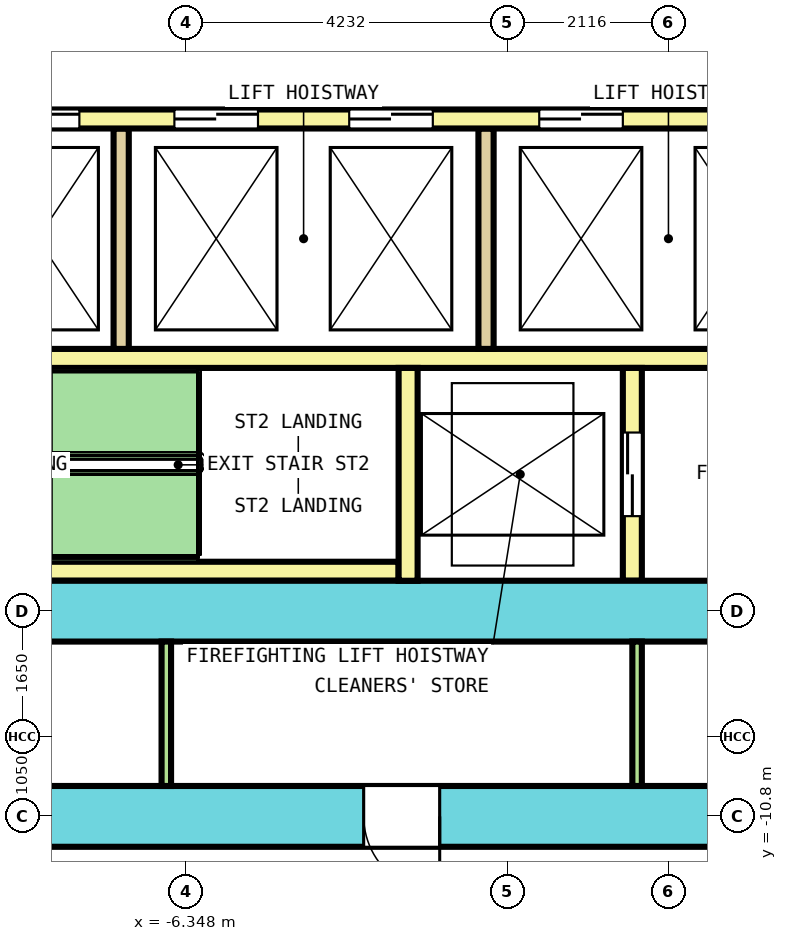
"""IFC4 building model, lengths in metres.
Left out: names, types, materials, properties, quantities, classifications, styles, units other than length and angle.
Written with IfcOpenShell. Run it as: python <this file> out.ifc"""

import sys

from ifc_helpers import new_model, si_unit, direction, frame, frame_2d, origin, place, context, subcontext, project, spatial, rectangle, extrude, element, fill, save


model = new_model("IFC4")
c1 = context("Model", 3, precision=1e-05, world=origin(), true_north=direction((0.0, 1.0)))
c2 = subcontext(c1, "Body", "Model", "MODEL_VIEW")
j1 = project(units=[si_unit("LENGTHUNIT", "METRE"), si_unit("PLANEANGLEUNIT", "RADIAN")], contexts=[c1])
p1 = place(None, origin())
s1 = spatial("IfcSite", under=j1, at=p1, CompositionType="ELEMENT")
p2 = place(p1, origin())
s2 = spatial("IfcBuilding", under=s1, at=p2, CompositionType="ELEMENT")
p3 = place(p2, frame((0.0, 0.0, 107.2)))
s3 = spatial("IfcBuildingStorey", under=s2, at=p3, CompositionType="ELEMENT", Elevation=107.2)
p4 = place(p3, frame((-13.6, -10.8, 0.0), z_axis=(0.0, 0.0, 1.0), x_axis=(1.0, 0.0, 0.0)))
e1 = element("IfcWall", 1, at=p4, inside=s3, PredefinedType="SHEAR", context=c2, shape_type="SweptSolid", body=[
    extrude(rectangle(XDim=27.2, YDim=0.8, at=frame_2d((13.6, 0.0))), origin(), (0.0, 0.0, 1.0), 5.7),
])
p5 = place(p4, frame((3.365, 0.0, 0.0)))
e2 = element("IfcOpeningElement", 2, at=p5, cuts=e1, PredefinedType="OPENING", context=c2, shape_type="SweptSolid", body=[
    extrude(rectangle(XDim=1.0, YDim=2.1, at=frame_2d((0.5, 1.05))), frame((0.0, 0.41, 0.0), z_axis=(0.0, -1.0, 0.0), x_axis=(1.0, 0.0, 0.0)), (0.0, 0.0, 1.0), 0.82),
])
p6 = place(p4, frame((9.591, 0.0, 0.0)))
e3 = element("IfcOpeningElement", 3, at=p6, cuts=e1, PredefinedType="OPENING", context=c2, shape_type="SweptSolid", body=[
    extrude(rectangle(XDim=1.0, YDim=2.1, at=frame_2d((0.5, 1.05))), frame((0.0, 0.41, 0.0), z_axis=(0.0, -1.0, 0.0), x_axis=(1.0, 0.0, 0.0)), (0.0, 0.0, 1.0), 0.82),
])
p7 = place(p4, frame((19.834, 0.0, 0.0)))
e4 = element("IfcOpeningElement", 4, at=p7, cuts=e1, PredefinedType="OPENING", context=c2, shape_type="SweptSolid", body=[
    extrude(rectangle(XDim=1.0, YDim=2.1, at=frame_2d((0.5, 1.05))), frame((0.0, 0.41, 0.0), z_axis=(0.0, -1.0, 0.0), x_axis=(1.0, 0.0, 0.0)), (0.0, 0.0, 1.0), 0.82),
])
p8 = place(p4, frame((23.909, 0.0, 0.0)))
e5 = element("IfcOpeningElement", 5, at=p8, cuts=e1, PredefinedType="OPENING", context=c2, shape_type="SweptSolid", body=[
    extrude(rectangle(XDim=1.0, YDim=2.1, at=frame_2d((0.5, 1.05))), frame((0.0, 0.41, 0.0), z_axis=(0.0, -1.0, 0.0), x_axis=(1.0, 0.0, 0.0)), (0.0, 0.0, 1.0), 0.82),
])
p9 = place(p4, frame((15.15, 0.0, 0.0)))
e6 = element("IfcOpeningElement", 6, at=p9, cuts=e1, PredefinedType="OPENING", context=c2, shape_type="SweptSolid", body=[
    extrude(rectangle(XDim=1.2, YDim=2.1, at=frame_2d((0.6, 1.05))), frame((0.0, 0.41, 0.0), z_axis=(0.0, -1.0, 0.0), x_axis=(1.0, 0.0, 0.0)), (0.0, 0.0, 1.0), 0.82),
])
p10 = place(p3, frame((-12.8, -8.1, 0.0), z_axis=(0.0, 0.0, 1.0), x_axis=(1.0, 0.0, 0.0)))
e7 = element("IfcWall", 7, at=p10, inside=s3, PredefinedType="SHEAR", context=c2, shape_type="SweptSolid", body=[
    extrude(rectangle(XDim=25.6, YDim=0.8, at=frame_2d((12.8, 0.0))), origin(), (0.0, 0.0, 1.0), 5.7),
])
p11 = place(p10, frame((14.35, 0.0, 0.0)))
e8 = element("IfcOpeningElement", 8, at=p11, cuts=e7, PredefinedType="OPENING", context=c2, shape_type="SweptSolid", body=[
    extrude(rectangle(XDim=1.2, YDim=2.1, at=frame_2d((0.6, 1.05))), frame((0.0, 0.41, 0.0), z_axis=(0.0, -1.0, 0.0), x_axis=(1.0, 0.0, 0.0)), (0.0, 0.0, 1.0), 0.82),
])
p12 = place(p3, frame((-9.35, -1.625, 0.0), z_axis=(0.0, 0.0, 1.0), x_axis=(1.0, 0.0, 0.0)))
e9 = element("IfcWall", 9, at=p12, inside=s3, PredefinedType="SOLIDWALL", context=c2, shape_type="SweptSolid", body=[
    extrude(rectangle(XDim=18.7, YDim=0.25, at=frame_2d((9.35, 0.0))), origin(), (0.0, 0.0, 1.0), 5.7),
])
p13 = place(p12, frame((0.5, 0.0, 0.0)))
e10 = element("IfcOpeningElement", 10, at=p13, cuts=e9, PredefinedType="OPENING", context=c2, shape_type="SweptSolid", body=[
    extrude(rectangle(XDim=1.1, YDim=2.1, at=frame_2d((0.55, 1.05))), frame((0.0, 0.135, 0.0), z_axis=(0.0, -1.0, 0.0), x_axis=(1.0, 0.0, 0.0)), (0.0, 0.0, 1.0), 0.27),
])
p14 = place(p12, frame((2.85, 0.0, 0.0)))
e11 = element("IfcOpeningElement", 11, at=p14, cuts=e9, PredefinedType="OPENING", context=c2, shape_type="SweptSolid", body=[
    extrude(rectangle(XDim=1.1, YDim=2.1, at=frame_2d((0.55, 1.05))), frame((0.0, 0.135, 0.0), z_axis=(0.0, -1.0, 0.0), x_axis=(1.0, 0.0, 0.0)), (0.0, 0.0, 1.0), 0.27),
])
p15 = place(p12, frame((5.15, 0.0, 0.0)))
e12 = element("IfcOpeningElement", 12, at=p15, cuts=e9, PredefinedType="OPENING", context=c2, shape_type="SweptSolid", body=[
    extrude(rectangle(XDim=1.1, YDim=2.1, at=frame_2d((0.55, 1.05))), frame((0.0, 0.135, 0.0), z_axis=(0.0, -1.0, 0.0), x_axis=(1.0, 0.0, 0.0)), (0.0, 0.0, 1.0), 0.27),
])
p16 = place(p12, frame((7.65, 0.0, 0.0)))
e13 = element("IfcOpeningElement", 13, at=p16, cuts=e9, PredefinedType="OPENING", context=c2, shape_type="SweptSolid", body=[
    extrude(rectangle(XDim=1.1, YDim=2.1, at=frame_2d((0.55, 1.05))), frame((0.0, 0.135, 0.0), z_axis=(0.0, -1.0, 0.0), x_axis=(1.0, 0.0, 0.0)), (0.0, 0.0, 1.0), 0.27),
])
p17 = place(p12, frame((9.95, 0.0, 0.0)))
e14 = element("IfcOpeningElement", 14, at=p17, cuts=e9, PredefinedType="OPENING", context=c2, shape_type="SweptSolid", body=[
    extrude(rectangle(XDim=1.1, YDim=2.1, at=frame_2d((0.55, 1.05))), frame((0.0, 0.135, 0.0), z_axis=(0.0, -1.0, 0.0), x_axis=(1.0, 0.0, 0.0)), (0.0, 0.0, 1.0), 0.27),
])
p18 = place(p12, frame((12.4, 0.0, 0.0)))
e15 = element("IfcOpeningElement", 15, at=p18, cuts=e9, PredefinedType="OPENING", context=c2, shape_type="SweptSolid", body=[
    extrude(rectangle(XDim=1.1, YDim=2.1, at=frame_2d((0.55, 1.05))), frame((0.0, 0.135, 0.0), z_axis=(0.0, -1.0, 0.0), x_axis=(1.0, 0.0, 0.0)), (0.0, 0.0, 1.0), 0.27),
])
p19 = place(p12, frame((14.8, 0.0, 0.0)))
e16 = element("IfcOpeningElement", 16, at=p19, cuts=e9, PredefinedType="OPENING", context=c2, shape_type="SweptSolid", body=[
    extrude(rectangle(XDim=1.1, YDim=2.1, at=frame_2d((0.55, 1.05))), frame((0.0, 0.135, 0.0), z_axis=(0.0, -1.0, 0.0), x_axis=(1.0, 0.0, 0.0)), (0.0, 0.0, 1.0), 0.27),
])
p20 = place(p12, frame((17.1, 0.0, 0.0)))
e17 = element("IfcOpeningElement", 17, at=p20, cuts=e9, PredefinedType="OPENING", context=c2, shape_type="SweptSolid", body=[
    extrude(rectangle(XDim=1.1, YDim=2.1, at=frame_2d((0.55, 1.05))), frame((0.0, 0.135, 0.0), z_axis=(0.0, -1.0, 0.0), x_axis=(1.0, 0.0, 0.0)), (0.0, 0.0, 1.0), 0.27),
])
p21 = place(p3, frame((-9.35, -4.775, 0.0), z_axis=(0.0, 0.0, 1.0), x_axis=(1.0, 0.0, 0.0)))
e18 = element("IfcWall", 18, at=p21, inside=s3, PredefinedType="SOLIDWALL", context=c2, shape_type="SweptSolid", body=[
    extrude(rectangle(XDim=18.7, YDim=0.25, at=frame_2d((9.35, 0.0))), origin(), (0.0, 0.0, 1.0), 5.7),
])
for number, where, z_axis, x_axis in (
    (19, (-7.2, -4.65, 0.0), (0.0, 0.0, 1.0), (0.0, 1.0, 0.0)),
    (20, (-2.4, -4.65, 0.0), (0.0, 0.0, 1.0), (0.0, 1.0, 0.0)),
):
    element("IfcWall", number, at=place(p3, frame(where, z_axis=z_axis, x_axis=x_axis)), inside=s3, PredefinedType="SOLIDWALL", context=c2, shape_type="SweptSolid", body=[
        extrude(rectangle(XDim=2.9, YDim=0.2, at=frame_2d((1.45, 0.0))), origin(), (0.0, 0.0, 1.0), 5.7),
    ])
p22 = place(p3, frame((-9.35, -7.575, 0.0), z_axis=(0.0, 0.0, 1.0), x_axis=(1.0, 0.0, 0.0)))
e21 = element("IfcWall", 21, at=p22, inside=s3, PredefinedType="SOLIDWALL", context=c2, shape_type="SweptSolid", body=[
    extrude(rectangle(XDim=5.8, YDim=0.25, at=frame_2d((2.9, 0.0))), origin(), (0.0, 0.0, 1.0), 5.7),
])
p23 = place(p3, frame((-3.425, -7.7, 0.0), z_axis=(0.0, 0.0, 1.0), x_axis=(0.0, 1.0, 0.0)))
e22 = element("IfcWall", 22, at=p23, inside=s3, PredefinedType="SOLIDWALL", context=c2, shape_type="SweptSolid", body=[
    extrude(rectangle(XDim=2.8, YDim=0.25, at=frame_2d((1.4, 0.0))), origin(), (0.0, 0.0, 1.0), 5.7),
])
p24 = place(p3, frame((-0.475, -7.7, 0.0), z_axis=(0.0, 0.0, 1.0), x_axis=(0.0, 1.0, 0.0)))
e23 = element("IfcWall", 23, at=p24, inside=s3, PredefinedType="SOLIDWALL", context=c2, shape_type="SweptSolid", body=[
    extrude(rectangle(XDim=2.8, YDim=0.25, at=frame_2d((1.4, 0.0))), origin(), (0.0, 0.0, 1.0), 5.7),
])
p25 = place(p24, frame((0.85, 0.0, 0.0)))
e24 = element("IfcOpeningElement", 24, at=p25, cuts=e23, PredefinedType="OPENING", context=c2, shape_type="SweptSolid", body=[
    extrude(rectangle(XDim=1.1, YDim=2.1, at=frame_2d((0.55, 1.05))), frame((0.0, 0.135, 0.0), z_axis=(0.0, -1.0, 0.0), x_axis=(1.0, 0.0, 0.0)), (0.0, 0.0, 1.0), 0.27),
])
for number, where, z_axis, x_axis in (
    (25, (-6.606, -10.4, 0.0), (0.0, 0.0, 1.0), (0.0, 1.0, 0.0)),
    (26, (-0.413, -10.4, 0.0), (0.0, 0.0, 1.0), (0.0, 1.0, 0.0)),
):
    element("IfcWall", number, at=place(p3, frame(where, z_axis=z_axis, x_axis=x_axis)), inside=s3, PredefinedType="PARTITIONING", context=c2, shape_type="SweptSolid", body=[
        extrude(rectangle(XDim=1.9, YDim=0.125, at=frame_2d((0.95, 0.0))), origin(), (0.0, 0.0, 1.0), 5.7),
    ])
p26 = place(p13, origin())
e27 = element("IfcDoor", 27, at=p26, inside=s3, OperationType="DOUBLE_DOOR_SLIDING", PredefinedType="DOOR", context=c2, shape_type="SweptSolid", body=[
    extrude(rectangle(XDim=1.1, YDim=2.1, at=frame_2d((0.55, 1.05))), frame((0.0, 0.075, 0.0), z_axis=(0.0, -1.0, 0.0), x_axis=(1.0, 0.0, 0.0)), (0.0, 0.0, 1.0), 0.15),
])
fill(e10, e27)
p27 = place(p14, origin())
e28 = element("IfcDoor", 28, at=p27, inside=s3, OperationType="DOUBLE_DOOR_SLIDING", PredefinedType="DOOR", context=c2, shape_type="SweptSolid", body=[
    extrude(rectangle(XDim=1.1, YDim=2.1, at=frame_2d((0.55, 1.05))), frame((0.0, 0.075, 0.0), z_axis=(0.0, -1.0, 0.0), x_axis=(1.0, 0.0, 0.0)), (0.0, 0.0, 1.0), 0.15),
])
fill(e11, e28)
p28 = place(p15, origin())
e29 = element("IfcDoor", 29, at=p28, inside=s3, OperationType="DOUBLE_DOOR_SLIDING", PredefinedType="DOOR", context=c2, shape_type="SweptSolid", body=[
    extrude(rectangle(XDim=1.1, YDim=2.1, at=frame_2d((0.55, 1.05))), frame((0.0, 0.075, 0.0), z_axis=(0.0, -1.0, 0.0), x_axis=(1.0, 0.0, 0.0)), (0.0, 0.0, 1.0), 0.15),
])
fill(e12, e29)
p29 = place(p16, origin())
e30 = element("IfcDoor", 30, at=p29, inside=s3, OperationType="DOUBLE_DOOR_SLIDING", PredefinedType="DOOR", context=c2, shape_type="SweptSolid", body=[
    extrude(rectangle(XDim=1.1, YDim=2.1, at=frame_2d((0.55, 1.05))), frame((0.0, 0.075, 0.0), z_axis=(0.0, -1.0, 0.0), x_axis=(1.0, 0.0, 0.0)), (0.0, 0.0, 1.0), 0.15),
])
fill(e13, e30)
p30 = place(p25, origin())
e31 = element("IfcDoor", 31, at=p30, inside=s3, OperationType="DOUBLE_DOOR_SLIDING", PredefinedType="DOOR", context=c2, shape_type="SweptSolid", body=[
    extrude(rectangle(XDim=1.1, YDim=2.1, at=frame_2d((0.55, 1.05))), frame((0.0, 0.075, 0.0), z_axis=(0.0, -1.0, 0.0), x_axis=(1.0, 0.0, 0.0)), (0.0, 0.0, 1.0), 0.15),
])
fill(e24, e31)
p31 = place(p6, origin())
e32 = element("IfcDoor", 32, at=p31, inside=s3, OperationType="SINGLE_SWING_RIGHT", PredefinedType="DOOR", context=c2, shape_type="SweptSolid", body=[
    extrude(rectangle(XDim=1.0, YDim=2.1, at=frame_2d((0.5, 1.05))), frame((0.0, 0.3, 0.0), z_axis=(0.0, -1.0, 0.0), x_axis=(1.0, 0.0, 0.0)), (0.0, 0.0, 1.0), 0.6),
])
fill(e3, e32)
save(model, sys.argv[1])
